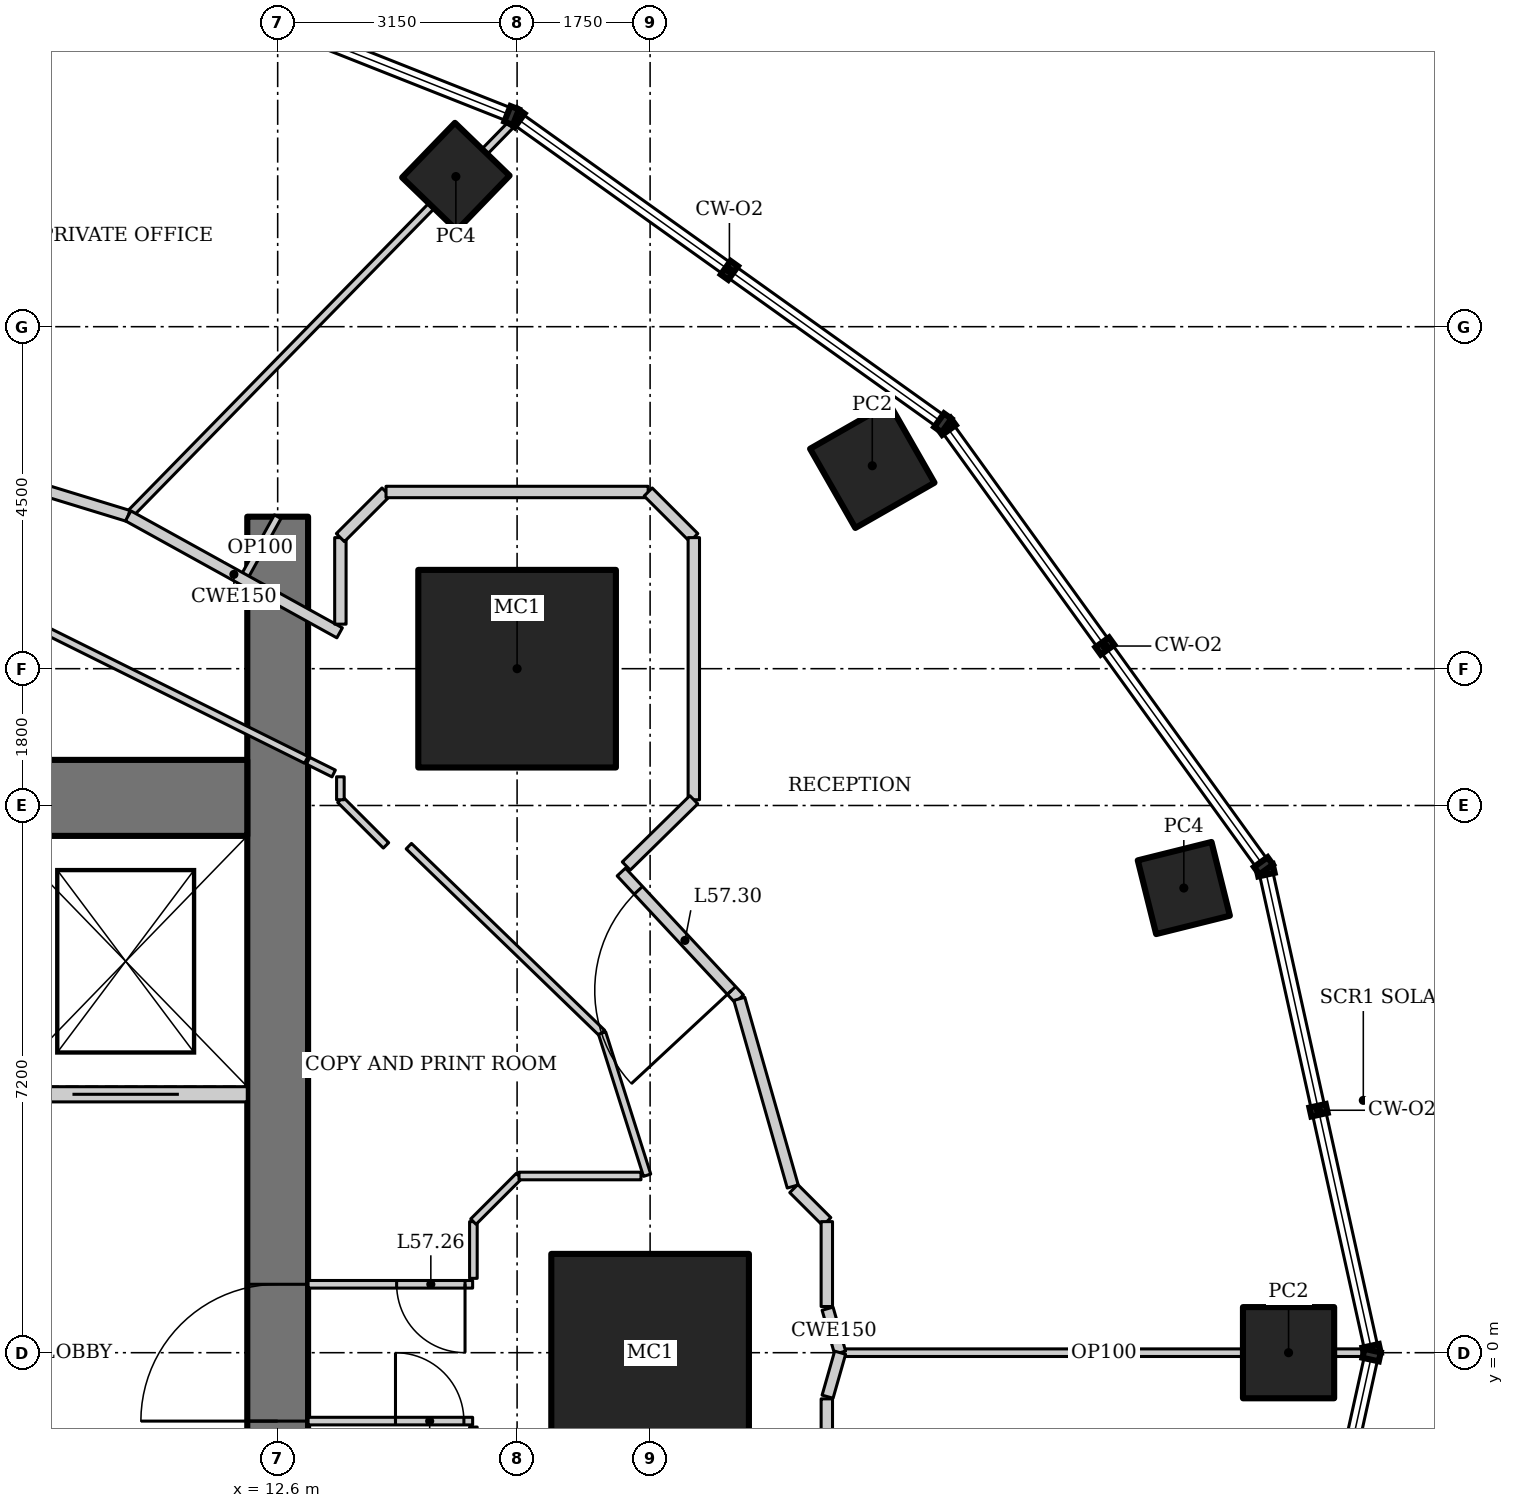
"""IFC4 building model, lengths in metres.
Left out: names, types, materials, properties, quantities, classifications, styles, units other than length and angle.
Written with IfcOpenShell. Run it as: python <this file> out.ifc"""

import sys

from ifc_helpers import new_model, si_unit, direction, frame, frame_2d, origin, origin_2d, place, context, subcontext, project, spatial, rectangle, hollow_rectangle, extrude, element, fill, save


model = new_model("IFC4")
c1 = context("Model", 3, precision=1e-05, world=origin(), true_north=direction((0.0, 1.0)))
c2 = subcontext(c1, "Body", "Model", "MODEL_VIEW")
j1 = project(units=[si_unit("LENGTHUNIT", "METRE"), si_unit("PLANEANGLEUNIT", "RADIAN")], contexts=[c1])
p1 = place(None, origin())
s1 = spatial("IfcSite", under=j1, at=p1, CompositionType="ELEMENT")
p2 = place(p1, origin())
s2 = spatial("IfcBuilding", under=s1, at=p2, CompositionType="ELEMENT")
p3 = place(p2, frame((0.0, 0.0, 245.2)))
s3 = spatial("IfcBuildingStorey", under=s2, at=p3, CompositionType="ELEMENT", Elevation=245.2)
for number, where, z_axis, x_axis in (
    (1, (17.5, 0.0, 0.0), (0.0, 0.0, 1.0), (1.0, 0.0, 0.0)),
    (2, (15.75, 9.0, 0.0), (0.0, 0.0, 1.0), (1.0, 0.0, 0.0)),
):
    element("IfcColumn", number, at=place(p3, frame(where, z_axis=z_axis, x_axis=x_axis)), inside=s3, PredefinedType="COLUMN", context=c2, shape_type="SweptSolid", body=[
        extrude(hollow_rectangle(XDim=2.6, YDim=2.6, WallThickness=0.13, at=origin_2d()), origin(), (0.0, 0.0, 1.0), 4.2),
    ])
p4 = place(p3, frame((25.9, 0.0, 0.0), z_axis=(0.0, 0.0, 1.0), x_axis=(1.0, 0.0, 0.0)))
e3 = element("IfcColumn", 3, at=p4, inside=s3, PredefinedType="COLUMN", context=c2, shape_type="SweptSolid", body=[
    extrude(hollow_rectangle(XDim=1.2, YDim=1.2, WallThickness=0.1, at=origin_2d()), origin(), (0.0, 0.0, 1.0), 4.2),
])
p5 = place(p3, frame((24.522, 6.114, 0.0), z_axis=(0.0, 0.0, 1.0), x_axis=(0.970295726276, 0.2419218956, 0.0)))
e4 = element("IfcColumn", 4, at=p5, inside=s3, PredefinedType="COLUMN", context=c2, shape_type="SweptSolid", body=[
    extrude(hollow_rectangle(XDim=1.0, YDim=1.0, WallThickness=0.08, at=origin_2d()), origin(), (0.0, 0.0, 1.0), 4.2),
])
p6 = place(p3, frame((20.423, 11.67, 0.0), z_axis=(0.0, 0.0, 1.0), x_axis=(0.86824298017, 0.496139221777, 0.0)))
e5 = element("IfcColumn", 5, at=p6, inside=s3, PredefinedType="COLUMN", context=c2, shape_type="SweptSolid", body=[
    extrude(hollow_rectangle(XDim=1.2, YDim=1.2, WallThickness=0.1, at=origin_2d()), origin(), (0.0, 0.0, 1.0), 4.2),
])
for number, where, z_axis, x_axis in (
    (6, (14.944, 15.475, 0.0), (0.0, 0.0, 1.0), (0.695, 0.719, 0.0)),
    (7, (9.035, 17.731, 0.0), (0.0, 0.0, 1.0), (0.454, 0.891, 0.0)),
):
    element("IfcColumn", number, at=place(p3, frame(where, z_axis=z_axis, x_axis=x_axis)), inside=s3, PredefinedType="COLUMN", context=c2, shape_type="SweptSolid", body=[
        extrude(hollow_rectangle(XDim=1.0, YDim=1.0, WallThickness=0.08, at=origin_2d()), origin(), (0.0, 0.0, 1.0), 4.2),
    ])
p7 = place(p3, frame((12.6, -11.0, 0.0), z_axis=(0.0, 0.0, 1.0), x_axis=(0.0, 1.0, 0.0)))
e8 = element("IfcWall", 8, at=p7, inside=s3, PredefinedType="SHEAR", context=c2, shape_type="SweptSolid", body=[
    extrude(rectangle(XDim=22.0, YDim=0.8, at=frame_2d((11.0, 0.0))), origin(), (0.0, 0.0, 1.0), 4.2),
])
p8 = place(p7, frame((10.1, 0.0, 0.0)))
e9 = element("IfcOpeningElement", 9, at=p8, cuts=e8, PredefinedType="OPENING", context=c2, shape_type="SweptSolid", body=[
    extrude(rectangle(XDim=1.8, YDim=2.1, at=frame_2d((0.9, 1.05))), frame((0.0, 0.41, 0.0), z_axis=(0.0, -1.0, 0.0), x_axis=(1.0, 0.0, 0.0)), (0.0, 0.0, 1.0), 0.82),
])
p9 = place(p3, frame((12.2, 7.3, 0.0), z_axis=(0.0, 0.0, 1.0), x_axis=(-1.0, 0.0, 0.0)))
e10 = element("IfcWall", 10, at=p9, inside=s3, PredefinedType="SHEAR", context=c2, shape_type="SweptSolid", body=[
    extrude(rectangle(XDim=6.6, YDim=1.0, at=frame_2d((3.3, 0.0))), origin(), (0.0, 0.0, 1.0), 4.2),
])
p10 = place(p3, frame((12.2, 3.4, 0.0), z_axis=(0.0, 0.0, 1.0), x_axis=(-1.0, 0.0, 0.0)))
e11 = element("IfcWall", 11, at=p10, inside=s3, PredefinedType="SOLIDWALL", context=c2, shape_type="SweptSolid", body=[
    extrude(rectangle(XDim=6.6, YDim=0.2, at=frame_2d((3.3, 0.0))), origin(), (0.0, 0.0, 1.0), 4.2),
])
p11 = place(p10, frame((4.45, 0.0, 0.0)))
e12 = element("IfcOpeningElement", 12, at=p11, cuts=e11, PredefinedType="OPENING", context=c2, shape_type="SweptSolid", body=[
    extrude(rectangle(XDim=1.1, YDim=2.2, at=frame_2d((0.55, 1.1))), frame((0.0, 0.11, 0.0), z_axis=(0.0, -1.0, 0.0), x_axis=(1.0, 0.0, 0.0)), (0.0, 0.0, 1.0), 0.22),
])
p12 = place(p10, frame((0.9, 0.0, 0.0)))
e13 = element("IfcOpeningElement", 13, at=p12, cuts=e11, PredefinedType="OPENING", context=c2, shape_type="SweptSolid", body=[
    extrude(rectangle(XDim=1.4, YDim=2.2, at=frame_2d((0.7, 1.1))), frame((0.0, 0.11, 0.0), z_axis=(0.0, -1.0, 0.0), x_axis=(1.0, 0.0, 0.0)), (0.0, 0.0, 1.0), 0.22),
])
p13 = place(p3, frame((26.944, 0.0, 0.0), z_axis=(0.0, 0.0, 1.0), x_axis=(-1.0, 0.0, 0.0)))
e14 = element("IfcWall", 14, at=p13, inside=s3, PredefinedType="PARTITIONING", context=c2, shape_type="SweptSolid", body=[
    extrude(rectangle(XDim=6.944, YDim=0.1, at=frame_2d((3.472, 0.0))), origin(), (0.0, 0.0, 1.0), 3.349),
])
p14 = place(p3, frame((15.709, 16.199, 0.0), z_axis=(0.0, 0.0, 1.0), x_axis=(-0.699362525935, -0.714767135029, 0.0)))
e15 = element("IfcWall", 15, at=p14, inside=s3, PredefinedType="PARTITIONING", context=c2, shape_type="SweptSolid", body=[
    extrude(rectangle(XDim=7.259, YDim=0.1, at=frame_2d((3.629, 0.0))), origin(), (0.0, 0.0, 1.0), 3.41),
])
p15 = place(p3, frame((10.633, 11.01, 0.0), z_axis=(0.0, 0.0, 1.0), x_axis=(-0.956185837153, 0.292760388079, 0.0)))
e16 = element("IfcWall", 16, at=p15, inside=s3, PredefinedType="PARTITIONING", context=c2, shape_type="SweptSolid", body=[
    extrude(rectangle(XDim=4.544, YDim=0.15, at=frame_2d((2.272, 0.0))), origin(), (0.0, 0.0, 1.0), 4.05),
])
p16 = place(p15, frame((3.494, 0.0, 0.0)))
e17 = element("IfcOpeningElement", 17, at=p16, cuts=e16, PredefinedType="OPENING", context=c2, shape_type="SweptSolid", body=[
    extrude(rectangle(XDim=0.9, YDim=2.1, at=frame_2d((0.45, 1.05))), frame((0.0, 0.085, 0.0), z_axis=(0.0, -1.0, 0.0), x_axis=(1.0, 0.0, 0.0)), (0.0, 0.0, 1.0), 0.17),
])
p17 = place(p3, frame((13.0, 7.788, 0.0), z_axis=(0.0, 0.0, 1.0), x_axis=(0.895721570004, -0.444615416995, 0.0)))
e18 = element("IfcWall", 18, at=p17, inside=s3, PredefinedType="PARTITIONING", context=c2, shape_type="SweptSolid", body=[
    extrude(rectangle(XDim=0.376, YDim=0.1, at=frame_2d((0.188, 0.0))), origin(), (0.0, 0.0, 1.0), 4.05),
])
p18 = place(p3, frame((9.298, 9.628, 0.0), z_axis=(0.0, 0.0, 1.0), x_axis=(0.895529831139, -0.445001484874, 0.0)))
e19 = element("IfcWall", 19, at=p18, inside=s3, PredefinedType="PARTITIONING", context=c2, shape_type="SweptSolid", body=[
    extrude(rectangle(XDim=4.108, YDim=0.1, at=frame_2d((2.054, 0.0))), origin(), (0.0, 0.0, 1.0), 4.05),
])
p19 = place(p3, frame((12.6, 11.0, 0.0), z_axis=(0.0, 0.0, 1.0), x_axis=(-0.484103558985, -0.875010710893, 0.0)))
e20 = element("IfcWall", 20, at=p19, inside=s3, PredefinedType="PARTITIONING", context=c2, shape_type="SweptSolid", body=[
    extrude(rectangle(XDim=0.943, YDim=0.1, at=frame_2d((0.472, 0.0))), origin(), (0.0, 0.0, 1.0), 4.05),
])
p20 = place(p3, frame((18.673, 4.656, 0.0), z_axis=(0.0, 0.0, 1.0), x_axis=(-0.680985069419, 0.732297299755, 0.0)))
e21 = element("IfcWall", 21, at=p20, inside=s3, PredefinedType="PARTITIONING", context=c2, shape_type="SweptSolid", body=[
    extrude(rectangle(XDim=2.279, YDim=0.15, at=frame_2d((1.14, 0.0))), origin(), (0.0, 0.0, 1.0), 4.05),
])
p21 = place(p20, frame((0.15, 0.0, 0.0)))
e22 = element("IfcOpeningElement", 22, at=p21, cuts=e21, PredefinedType="OPENING", context=c2, shape_type="SweptSolid", body=[
    extrude(rectangle(XDim=1.8, YDim=2.1, at=frame_2d((0.9, 1.05))), frame((0.0, 0.085, 0.0), z_axis=(0.0, -1.0, 0.0), x_axis=(1.0, 0.0, 0.0)), (0.0, 0.0, 1.0), 0.17),
])
p22 = place(p3, frame((13.415, 9.472, 0.0), z_axis=(0.0, 0.0, 1.0), x_axis=(-0.875072100837, 0.483992580869, 0.0)))
e23 = element("IfcWall", 23, at=p22, inside=s3, PredefinedType="PARTITIONING", context=c2, shape_type="SweptSolid", body=[
    extrude(rectangle(XDim=3.179, YDim=0.15, at=frame_2d((1.59, 0.0))), origin(), (0.0, 0.0, 1.0), 4.05),
])
p23 = place(p3, frame((14.325, 6.665, 0.0), z_axis=(0.0, 0.0, 1.0), x_axis=(0.718810161381, -0.695206409562, 0.0)))
e24 = element("IfcWall", 24, at=p23, inside=s3, PredefinedType="PARTITIONING", context=c2, shape_type="SweptSolid", body=[
    extrude(rectangle(XDim=3.537, YDim=0.1, at=frame_2d((1.769, 0.0))), origin(), (0.0, 0.0, 1.0), 4.05),
])
p24 = place(p3, frame((14.025, 6.675, 0.0), z_axis=(0.0, 0.0, 1.0), x_axis=(-0.707106781187, 0.707106781187, 0.0)))
e25 = element("IfcWall", 25, at=p24, inside=s3, PredefinedType="PARTITIONING", context=c2, shape_type="SweptSolid", body=[
    extrude(rectangle(XDim=0.849, YDim=0.1, at=frame_2d((0.425, 0.0))), origin(), (0.0, 0.0, 1.0), 4.05),
])
p25 = place(p3, frame((13.425, 7.275, 0.0), z_axis=(0.0, 0.0, 1.0), x_axis=(0.0, 1.0, 0.0)))
e26 = element("IfcWall", 26, at=p25, inside=s3, PredefinedType="PARTITIONING", context=c2, shape_type="SweptSolid", body=[
    extrude(rectangle(XDim=0.302, YDim=0.1, at=frame_2d((0.151, 0.0))), origin(), (0.0, 0.0, 1.0), 4.05),
])
p26 = place(p3, frame((13.425, 9.586, 0.0), z_axis=(0.0, 0.0, 1.0), x_axis=(0.0, 1.0, 0.0)))
e27 = element("IfcWall", 27, at=p26, inside=s3, PredefinedType="PARTITIONING", context=c2, shape_type="SweptSolid", body=[
    extrude(rectangle(XDim=1.138, YDim=0.15, at=frame_2d((0.569, 0.0))), origin(), (0.0, 0.0, 1.0), 4.05),
])
p27 = place(p3, frame((13.425, 10.725, 0.0), z_axis=(0.0, 0.0, 1.0), x_axis=(0.707106781187, 0.707106781187, 0.0)))
e28 = element("IfcWall", 28, at=p27, inside=s3, PredefinedType="PARTITIONING", context=c2, shape_type="SweptSolid", body=[
    extrude(rectangle(XDim=0.849, YDim=0.15, at=frame_2d((0.425, 0.0))), origin(), (0.0, 0.0, 1.0), 4.05),
])
p28 = place(p3, frame((14.025, 11.325, 0.0), z_axis=(0.0, 0.0, 1.0), x_axis=(1.0, 0.0, 0.0)))
e29 = element("IfcWall", 29, at=p28, inside=s3, PredefinedType="PARTITIONING", context=c2, shape_type="SweptSolid", body=[
    extrude(rectangle(XDim=3.449, YDim=0.15, at=frame_2d((1.725, 0.0))), origin(), (0.0, 0.0, 1.0), 4.05),
])
p29 = place(p3, frame((17.475, 11.325, 0.0), z_axis=(0.0, 0.0, 1.0), x_axis=(0.707106781187, -0.707106781187, 0.0)))
e30 = element("IfcWall", 30, at=p29, inside=s3, PredefinedType="PARTITIONING", context=c2, shape_type="SweptSolid", body=[
    extrude(rectangle(XDim=0.849, YDim=0.15, at=frame_2d((0.425, 0.0))), origin(), (0.0, 0.0, 1.0), 4.05),
])
p30 = place(p3, frame((18.075, 10.725, 0.0), z_axis=(0.0, 0.0, 1.0), x_axis=(0.0, -1.0, 0.0)))
e31 = element("IfcWall", 31, at=p30, inside=s3, PredefinedType="PARTITIONING", context=c2, shape_type="SweptSolid", body=[
    extrude(rectangle(XDim=3.449, YDim=0.15, at=frame_2d((1.725, 0.0))), origin(), (0.0, 0.0, 1.0), 3.601),
])
p31 = place(p3, frame((18.075, 7.275, 0.0), z_axis=(0.0, 0.0, 1.0), x_axis=(-0.713842064016, -0.700306723973, 0.0)))
e32 = element("IfcWall", 32, at=p31, inside=s3, PredefinedType="PARTITIONING", context=c2, shape_type="SweptSolid", body=[
    extrude(rectangle(XDim=1.245, YDim=0.15, at=frame_2d((0.622, 0.0))), origin(), (0.0, 0.0, 1.0), 4.05),
])
p32 = place(p3, frame((20.0, 0.0, 0.0), z_axis=(0.0, 0.0, 1.0), x_axis=(-0.27407847996, 0.961707329089, 0.0)))
e33 = element("IfcWall", 33, at=p32, inside=s3, PredefinedType="PARTITIONING", context=c2, shape_type="SweptSolid", body=[
    extrude(rectangle(XDim=0.602, YDim=0.15, at=frame_2d((0.301, 0.0))), origin(), (0.0, 0.0, 1.0), 4.05),
])
p33 = place(p3, frame((19.377, 2.187, 0.0), z_axis=(0.0, 0.0, 1.0), x_axis=(-0.274067949327, 0.961710330168, 0.0)))
e34 = element("IfcWall", 34, at=p33, inside=s3, PredefinedType="PARTITIONING", context=c2, shape_type="SweptSolid", body=[
    extrude(rectangle(XDim=2.567, YDim=0.15, at=frame_2d((1.284, 0.0))), origin(), (0.0, 0.0, 1.0), 4.05),
])
p34 = place(p3, frame((19.835, -0.579, 0.0), z_axis=(0.0, 0.0, 1.0), x_axis=(0.27407847996, 0.961707329089, 0.0)))
e35 = element("IfcWall", 35, at=p34, inside=s3, PredefinedType="PARTITIONING", context=c2, shape_type="SweptSolid", body=[
    extrude(rectangle(XDim=0.602, YDim=0.15, at=frame_2d((0.301, 0.0))), origin(), (0.0, 0.0, 1.0), 4.05),
])
p35 = place(p3, frame((13.0, -0.9, 0.0), z_axis=(0.0, 0.0, 1.0), x_axis=(1.0, 0.0, 0.0)))
e36 = element("IfcWall", 36, at=p35, inside=s3, PredefinedType="PARTITIONING", context=c2, shape_type="SweptSolid", body=[
    extrude(rectangle(XDim=2.165, YDim=0.1, at=frame_2d((1.083, 0.0))), origin(), (0.0, 0.0, 1.0), 4.05),
])
p36 = place(p35, frame((1.15, 0.0, 0.0)))
e37 = element("IfcOpeningElement", 37, at=p36, cuts=e36, PredefinedType="OPENING", context=c2, shape_type="SweptSolid", body=[
    extrude(rectangle(XDim=0.9, YDim=2.1, at=frame_2d((0.45, 1.05))), frame((0.0, 0.06, 0.0), z_axis=(0.0, -1.0, 0.0), x_axis=(1.0, 0.0, 0.0)), (0.0, 0.0, 1.0), 0.12),
])
p37 = place(p3, frame((16.868, 4.206, 0.0), z_axis=(0.0, 0.0, 1.0), x_axis=(0.301821975729, -0.953364303384, 0.0)))
e38 = element("IfcWall", 38, at=p37, inside=s3, PredefinedType="PARTITIONING", context=c2, shape_type="SweptSolid", body=[
    extrude(rectangle(XDim=1.962, YDim=0.1, at=frame_2d((0.981, 0.0))), origin(), (0.0, 0.0, 1.0), 4.05),
])
p38 = place(p3, frame((15.165, 0.9, 0.0), z_axis=(0.0, 0.0, 1.0), x_axis=(-1.0, 0.0, 0.0)))
e39 = element("IfcWall", 39, at=p38, inside=s3, PredefinedType="PARTITIONING", context=c2, shape_type="SweptSolid", body=[
    extrude(rectangle(XDim=2.165, YDim=0.1, at=frame_2d((1.083, 0.0))), origin(), (0.0, 0.0, 1.0), 4.05),
])
p39 = place(p38, frame((0.1, 0.0, 0.0)))
e40 = element("IfcOpeningElement", 40, at=p39, cuts=e39, PredefinedType="OPENING", context=c2, shape_type="SweptSolid", body=[
    extrude(rectangle(XDim=0.9, YDim=2.1, at=frame_2d((0.45, 1.05))), frame((0.0, 0.06, 0.0), z_axis=(0.0, -1.0, 0.0), x_axis=(1.0, 0.0, 0.0)), (0.0, 0.0, 1.0), 0.12),
])
for number, where, z_axis, x_axis in (
    (41, (15.175, -1.725, 0.0), (0.0, 0.0, 1.0), (0.0, 1.0, 0.0)),
    (42, (15.175, 0.978, 0.0), (0.0, 0.0, 1.0), (0.0, 1.0, 0.0)),
):
    element("IfcWall", number, at=place(p3, frame(where, z_axis=z_axis, x_axis=x_axis)), inside=s3, PredefinedType="PARTITIONING", context=c2, shape_type="SweptSolid", body=[
        extrude(rectangle(XDim=0.746, YDim=0.1, at=frame_2d((0.373, 0.0))), origin(), (0.0, 0.0, 1.0), 4.05),
    ])
p40 = place(p3, frame((15.175, 1.725, 0.0), z_axis=(0.0, 0.0, 1.0), x_axis=(0.707106781187, 0.707106781187, 0.0)))
e43 = element("IfcWall", 43, at=p40, inside=s3, PredefinedType="PARTITIONING", context=c2, shape_type="SweptSolid", body=[
    extrude(rectangle(XDim=0.849, YDim=0.1, at=frame_2d((0.425, 0.0))), origin(), (0.0, 0.0, 1.0), 4.05),
])
p41 = place(p3, frame((15.775, 2.325, 0.0), z_axis=(0.0, 0.0, 1.0), x_axis=(1.0, 0.0, 0.0)))
e44 = element("IfcWall", 44, at=p41, inside=s3, PredefinedType="PARTITIONING", context=c2, shape_type="SweptSolid", body=[
    extrude(rectangle(XDim=1.604, YDim=0.1, at=frame_2d((0.802, 0.0))), origin(), (0.0, 0.0, 1.0), 4.05),
])
p42 = place(p3, frame((19.39, 2.159, 0.0), z_axis=(0.0, 0.0, 1.0), x_axis=(0.707106781187, -0.707106781187, 0.0)))
e45 = element("IfcWall", 45, at=p42, inside=s3, PredefinedType="PARTITIONING", context=c2, shape_type="SweptSolid", body=[
    extrude(rectangle(XDim=0.615, YDim=0.15, at=frame_2d((0.308, 0.0))), origin(), (0.0, 0.0, 1.0), 4.05),
])
for number, where, z_axis, x_axis in (
    (46, (19.825, 1.725, 0.0), (0.0, 0.0, 1.0), (0.0, -1.0, 0.0)),
    (47, (19.825, -0.607, 0.0), (0.0, 0.0, 1.0), (0.0, -1.0, 0.0)),
):
    element("IfcWall", number, at=place(p3, frame(where, z_axis=z_axis, x_axis=x_axis)), inside=s3, PredefinedType="PARTITIONING", context=c2, shape_type="SweptSolid", body=[
        extrude(rectangle(XDim=1.117, YDim=0.15, at=frame_2d((0.559, 0.0))), origin(), (0.0, 0.0, 1.0), 4.05),
    ])
p43 = place(p8, origin())
e48 = element("IfcDoor", 48, at=p43, inside=s3, OperationType="DOUBLE_DOOR_DOUBLE_SWING", PredefinedType="DOOR", context=c2, shape_type="SweptSolid", body=[
    extrude(rectangle(XDim=1.8, YDim=2.1, at=frame_2d((0.9, 1.05))), frame((0.0, 0.025, 0.0), z_axis=(0.0, -1.0, 0.0), x_axis=(1.0, 0.0, 0.0)), (0.0, 0.0, 1.0), 0.05),
])
fill(e9, e48)
p44 = place(p12, origin())
e49 = element("IfcDoor", 49, at=p44, inside=s3, OperationType="DOUBLE_DOOR_SLIDING", PredefinedType="DOOR", context=c2, shape_type="SweptSolid", body=[
    extrude(rectangle(XDim=1.4, YDim=2.2, at=frame_2d((0.7, 1.1))), frame((0.0, 0.025, 0.0), z_axis=(0.0, -1.0, 0.0), x_axis=(1.0, 0.0, 0.0)), (0.0, 0.0, 1.0), 0.05),
])
fill(e13, e49)
p45 = place(p36, origin())
e50 = element("IfcDoor", 50, at=p45, inside=s3, OperationType="SINGLE_SWING_LEFT", PredefinedType="DOOR", context=c2, shape_type="SweptSolid", body=[
    extrude(rectangle(XDim=0.9, YDim=2.1, at=frame_2d((0.45, 1.05))), frame((0.0, 0.025, 0.0), z_axis=(0.0, -1.0, 0.0), x_axis=(1.0, 0.0, 0.0)), (0.0, 0.0, 1.0), 0.05),
])
fill(e37, e50)
p46 = place(p39, origin())
e51 = element("IfcDoor", 51, at=p46, inside=s3, OperationType="SINGLE_SWING_LEFT", PredefinedType="DOOR", context=c2, shape_type="SweptSolid", body=[
    extrude(rectangle(XDim=0.9, YDim=2.1, at=frame_2d((0.45, 1.05))), frame((0.0, 0.025, 0.0), z_axis=(0.0, -1.0, 0.0), x_axis=(1.0, 0.0, 0.0)), (0.0, 0.0, 1.0), 0.05),
])
fill(e40, e51)
p47 = place(p21, origin())
e52 = element("IfcDoor", 52, at=p47, inside=s3, OperationType="DOUBLE_DOOR_DOUBLE_SWING", PredefinedType="DOOR", context=c2, shape_type="SweptSolid", body=[
    extrude(rectangle(XDim=1.8, YDim=2.1, at=frame_2d((0.9, 1.05))), frame((0.0, 0.025, 0.0), z_axis=(0.0, -1.0, 0.0), x_axis=(1.0, 0.0, 0.0)), (0.0, 0.0, 1.0), 0.05),
])
fill(e22, e52)
save(model, sys.argv[1])
